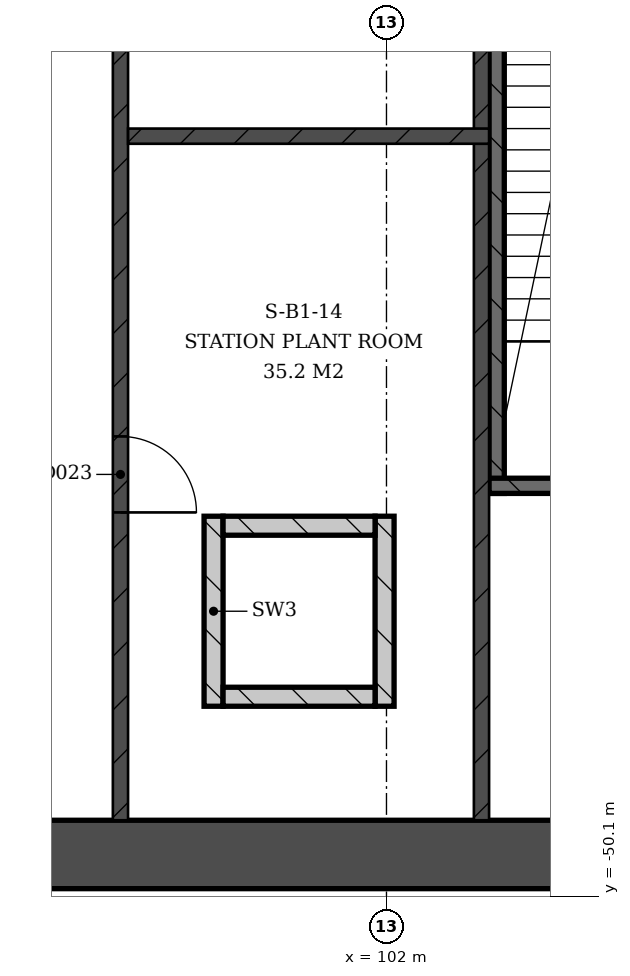
"""IFC4 building model, lengths in metres.
Left out: names, types, materials, properties, quantities, classifications, styles, units other than length and angle.
Written with IfcOpenShell. Run it as: python <this file> out.ifc"""

import sys

from ifc_helpers import new_model, si_unit, direction, frame, frame_2d, origin, place, context, subcontext, project, spatial, rectangle, extrude, element, fill, save


model = new_model("IFC4")
c1 = context("Model", 3, precision=1e-05, world=origin(), true_north=direction((0.0, 1.0)))
c2 = subcontext(c1, "Body", "Model", "MODEL_VIEW")
j1 = project(units=[si_unit("LENGTHUNIT", "METRE"), si_unit("PLANEANGLEUNIT", "RADIAN")], contexts=[c1])
p1 = place(None, origin())
s1 = spatial("IfcSite", under=j1, at=p1, CompositionType="ELEMENT")
p2 = place(p1, origin())
s2 = spatial("IfcBuilding", under=s1, at=p2, CompositionType="ELEMENT")
p3 = place(p2, frame((0.0, 0.0, -4.5)))
s3 = spatial("IfcBuildingStorey", under=s2, at=p3, CompositionType="ELEMENT", Elevation=-4.5)
p4 = place(p3, frame((95.9, -49.55, 0.0), z_axis=(0.0, 0.0, 1.0), x_axis=(1.0, 0.0, 0.0)))
e1 = element("IfcWall", 1, at=p4, inside=s3, PredefinedType="STANDARD", context=c2, shape_type="SweptSolid", body=[
    extrude(rectangle(XDim=23.2, YDim=0.9, at=frame_2d((11.6, 0.0))), origin(), (0.0, 0.0, 1.0), 3.5),
])
p5 = place(p3, frame((103.45, -44.8, 0.0), z_axis=(0.0, 0.0, 1.0), x_axis=(0.0, 1.0, 0.0)))
e2 = element("IfcWall", 2, at=p5, inside=s3, PredefinedType="SHEAR", context=c2, shape_type="SweptSolid", body=[
    extrude(rectangle(XDim=20.0, YDim=0.2, at=frame_2d((10.0, 0.0))), origin(), (0.0, 0.0, 1.0), 3.5),
])
p6 = place(p3, frame((103.35, -44.7, 0.0), z_axis=(0.0, 0.0, 1.0), x_axis=(1.0, 0.0, 0.0)))
e3 = element("IfcWall", 3, at=p6, inside=s3, PredefinedType="SHEAR", context=c2, shape_type="SweptSolid", body=[
    extrude(rectangle(XDim=3.2, YDim=0.2, at=frame_2d((1.6, 0.0))), origin(), (0.0, 0.0, 1.0), 3.5),
])
p7 = place(p3, frame((98.5, -49.1, 0.0), z_axis=(0.0, 0.0, 1.0), x_axis=(0.0, 1.0, 0.0)))
e4 = element("IfcWall", 4, at=p7, inside=s3, PredefinedType="PARTITIONING", context=c2, shape_type="SweptSolid", body=[
    extrude(rectangle(XDim=26.1, YDim=0.2, at=frame_2d((13.05, 0.0))), origin(), (0.0, 0.0, 1.0), 3.5),
])
p8 = place(p7, frame((4.05, 0.0, 0.0)))
e5 = element("IfcOpeningElement", 5, at=p8, cuts=e4, PredefinedType="OPENING", context=c2, shape_type="SweptSolid", body=[
    extrude(rectangle(XDim=1.0, YDim=2.1, at=frame_2d((0.5, 1.05))), frame((0.0, 0.1, 0.0), z_axis=(0.0, -1.0, 0.0), x_axis=(1.0, 0.0, 0.0)), (0.0, 0.0, 1.0), 0.2),
])
p9 = place(p7, frame((13.0, 0.0, 0.0)))
e6 = element("IfcOpeningElement", 6, at=p9, cuts=e4, PredefinedType="OPENING", context=c2, shape_type="SweptSolid", body=[
    extrude(rectangle(XDim=1.0, YDim=2.1, at=frame_2d((0.5, 1.05))), frame((0.0, 0.1, 0.0), z_axis=(0.0, -1.0, 0.0), x_axis=(1.0, 0.0, 0.0)), (0.0, 0.0, 1.0), 0.2),
])
p10 = place(p7, frame((21.5, 0.0, 0.0)))
e7 = element("IfcOpeningElement", 7, at=p10, cuts=e4, PredefinedType="OPENING", context=c2, shape_type="SweptSolid", body=[
    extrude(rectangle(XDim=1.0, YDim=2.1, at=frame_2d((0.5, 1.05))), frame((0.0, 0.1, 0.0), z_axis=(0.0, -1.0, 0.0), x_axis=(1.0, 0.0, 0.0)), (0.0, 0.0, 1.0), 0.2),
])
p11 = place(p3, frame((103.25, -49.1, 0.0), z_axis=(0.0, 0.0, 1.0), x_axis=(0.0, 1.0, 0.0)))
e8 = element("IfcWall", 8, at=p11, inside=s3, PredefinedType="PARTITIONING", context=c2, shape_type="SweptSolid", body=[
    extrude(rectangle(XDim=26.1, YDim=0.2, at=frame_2d((13.05, 0.0))), origin(), (0.0, 0.0, 1.0), 3.5),
])
p12 = place(p3, frame((98.6, -40.1, 0.0), z_axis=(0.0, 0.0, 1.0), x_axis=(1.0, 0.0, 0.0)))
e9 = element("IfcWall", 9, at=p12, inside=s3, PredefinedType="PARTITIONING", context=c2, shape_type="SweptSolid", body=[
    extrude(rectangle(XDim=4.75, YDim=0.2, at=frame_2d((2.375, 0.0))), origin(), (0.0, 0.0, 1.0), 3.5),
])
for number, where, z_axis, x_axis in (
    (10, (99.725, -47.6, 0.0), (0.0, 0.0, 1.0), (0.0, 1.0, 0.0)),
    (11, (101.975, -47.6, 0.0), (0.0, 0.0, 1.0), (0.0, 1.0, 0.0)),
):
    element("IfcWall", number, at=place(p3, frame(where, z_axis=z_axis, x_axis=x_axis)), inside=s3, PredefinedType="SHEAR", context=c2, shape_type="SweptSolid", body=[
        extrude(rectangle(XDim=2.5, YDim=0.25, at=frame_2d((1.25, 0.0))), origin(), (0.0, 0.0, 1.0), 4.5),
    ])
for number, where, z_axis, x_axis in (
    (12, (99.85, -47.475, 0.0), (0.0, 0.0, 1.0), (1.0, 0.0, 0.0)),
    (13, (99.85, -45.225, 0.0), (0.0, 0.0, 1.0), (1.0, 0.0, 0.0)),
):
    element("IfcWall", number, at=place(p3, frame(where, z_axis=z_axis, x_axis=x_axis)), inside=s3, PredefinedType="SHEAR", context=c2, shape_type="SweptSolid", body=[
        extrude(rectangle(XDim=2.0, YDim=0.25, at=frame_2d((1.0, 0.0))), origin(), (0.0, 0.0, 1.0), 4.5),
    ])
p13 = place(p8, origin())
e14 = element("IfcDoor", 14, at=p13, inside=s3, OperationType="SINGLE_SWING_LEFT", PredefinedType="DOOR", context=c2, shape_type="SweptSolid", body=[
    extrude(rectangle(XDim=1.0, YDim=2.1, at=frame_2d((0.5, 1.05))), frame((0.0, 0.025, 0.0), z_axis=(0.0, -1.0, 0.0), x_axis=(1.0, 0.0, 0.0)), (0.0, 0.0, 1.0), 0.05),
])
fill(e5, e14)
save(model, sys.argv[1])
